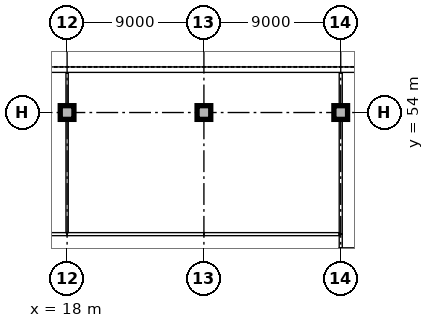
"""IFC4 building model, lengths in metres.
Left out: names, types, materials, properties, quantities, classifications, styles, units other than length and angle.
Written with IfcOpenShell. Run it as: python <this file> out.ifc"""

import sys

from ifc_helpers import new_model, si_unit, direction, frame, frame_2d, origin, origin_2d, place, context, subcontext, project, spatial, rectangle, extrude, element, fill, save


model = new_model("IFC4")
c1 = context("Model", 3, precision=1e-05, world=origin(), true_north=direction((0.0, 1.0)))
c2 = subcontext(c1, "Body", "Model", "MODEL_VIEW")
j1 = project(units=[si_unit("LENGTHUNIT", "METRE"), si_unit("PLANEANGLEUNIT", "RADIAN")], contexts=[c1])
p1 = place(None, origin())
s1 = spatial("IfcSite", under=j1, at=p1, CompositionType="ELEMENT")
p2 = place(p1, origin())
s2 = spatial("IfcBuilding", under=s1, at=p2, CompositionType="ELEMENT")
p3 = place(p2, origin())
s3 = spatial("IfcBuildingStorey", under=s2, at=p3, CompositionType="ELEMENT", Elevation=0.0)
for number, where, z_axis, x_axis in (
    (1, (18.0, 54.0, 0.0), (0.0, 0.0, 1.0), (1.0, 0.0, 0.0)),
    (2, (27.0, 54.0, 0.0), (0.0, 0.0, 1.0), (1.0, 0.0, 0.0)),
    (3, (36.0, 54.0, 0.0), (0.0, 0.0, 1.0), (1.0, 0.0, 0.0)),
):
    element("IfcColumn", number, at=place(p3, frame(where, z_axis=z_axis, x_axis=x_axis)), inside=s3, PredefinedType="COLUMN", context=c2, shape_type="SweptSolid", body=[
        extrude(rectangle(XDim=0.9, YDim=0.9, at=origin_2d()), origin(), (0.0, 0.0, 1.0), 5.7),
    ])
p4 = place(p3, frame((63.0, 56.82, 0.0), z_axis=(0.0, 0.0, 1.0), x_axis=(-1.0, 0.0, 0.0)))
e4 = element("IfcWall", 4, at=p4, inside=s3, PredefinedType="STANDARD", context=c2, shape_type="SweptSolid", body=[
    extrude(rectangle(XDim=57.4, YDim=0.36, at=frame_2d((28.7, 0.0))), origin(), (0.0, 0.0, 1.0), 5.7),
])
p5 = place(p4, frame((32.55, 0.0, 0.0)))
e5 = element("IfcOpeningElement", 5, at=p5, cuts=e4, PredefinedType="OPENING", context=c2, shape_type="SweptSolid", body=[
    extrude(rectangle(XDim=2.4, YDim=2.4, at=frame_2d((1.2, 1.2))), frame((0.0, 0.19, 0.0), z_axis=(0.0, -1.0, 0.0), x_axis=(1.0, 0.0, 0.0)), (0.0, 0.0, 1.0), 0.38),
])
p6 = place(p4, frame((48.3, 0.0, 0.0)))
e6 = element("IfcOpeningElement", 6, at=p6, cuts=e4, PredefinedType="OPENING", context=c2, shape_type="SweptSolid", body=[
    extrude(rectangle(XDim=2.4, YDim=2.2, at=frame_2d((1.2, 1.1))), frame((0.0, 0.19, 0.0), z_axis=(0.0, -1.0, 0.0), x_axis=(1.0, 0.0, 0.0)), (0.0, 0.0, 1.0), 0.38),
])
p7 = place(p4, frame((39.3, 0.0, 0.0)))
e7 = element("IfcOpeningElement", 7, at=p7, cuts=e4, PredefinedType="OPENING", context=c2, shape_type="SweptSolid", body=[
    extrude(rectangle(XDim=2.4, YDim=2.2, at=frame_2d((1.2, 1.1))), frame((0.0, 0.19, 0.0), z_axis=(0.0, -1.0, 0.0), x_axis=(1.0, 0.0, 0.0)), (0.0, 0.0, 1.0), 0.38),
])
p8 = place(p4, frame((12.3, 0.0, 0.0)))
e8 = element("IfcOpeningElement", 8, at=p8, cuts=e4, PredefinedType="OPENING", context=c2, shape_type="SweptSolid", body=[
    extrude(rectangle(XDim=2.4, YDim=2.2, at=frame_2d((1.2, 1.1))), frame((0.0, 0.19, 0.0), z_axis=(0.0, -1.0, 0.0), x_axis=(1.0, 0.0, 0.0)), (0.0, 0.0, 1.0), 0.38),
])
p9 = place(p4, frame((21.6, 0.0, 0.0)))
e9 = element("IfcOpeningElement", 9, at=p9, cuts=e4, PredefinedType="OPENING", context=c2, shape_type="SweptSolid", body=[
    extrude(rectangle(XDim=1.8, YDim=2.2, at=frame_2d((0.9, 1.1))), frame((0.0, 0.19, 0.0), z_axis=(0.0, -1.0, 0.0), x_axis=(1.0, 0.0, 0.0)), (0.0, 0.0, 1.0), 0.38),
])
p10 = place(p4, frame((2.1, 0.0, 0.0)))
e10 = element("IfcOpeningElement", 10, at=p10, cuts=e4, PredefinedType="OPENING", context=c2, shape_type="SweptSolid", body=[
    extrude(rectangle(XDim=1.8, YDim=2.2, at=frame_2d((0.9, 1.1))), frame((0.0, 0.19, 0.0), z_axis=(0.0, -1.0, 0.0), x_axis=(1.0, 0.0, 0.0)), (0.0, 0.0, 1.0), 0.38),
])
p11 = place(p4, frame((7.35, 0.0, 0.6)))
e11 = element("IfcOpeningElement", 11, at=p11, cuts=e4, PredefinedType="OPENING", context=c2, shape_type="SweptSolid", body=[
    extrude(rectangle(XDim=3.3, YDim=3.0, at=frame_2d((1.65, 1.5))), frame((0.0, 0.19, 0.0), z_axis=(0.0, -1.0, 0.0), x_axis=(1.0, 0.0, 0.0)), (0.0, 0.0, 1.0), 0.38),
])
p12 = place(p4, frame((16.35, 0.0, 0.6)))
e12 = element("IfcOpeningElement", 12, at=p12, cuts=e4, PredefinedType="OPENING", context=c2, shape_type="SweptSolid", body=[
    extrude(rectangle(XDim=3.3, YDim=3.0, at=frame_2d((1.65, 1.5))), frame((0.0, 0.19, 0.0), z_axis=(0.0, -1.0, 0.0), x_axis=(1.0, 0.0, 0.0)), (0.0, 0.0, 1.0), 0.38),
])
p13 = place(p4, frame((25.35, 0.0, 0.6)))
e13 = element("IfcOpeningElement", 13, at=p13, cuts=e4, PredefinedType="OPENING", context=c2, shape_type="SweptSolid", body=[
    extrude(rectangle(XDim=3.3, YDim=3.0, at=frame_2d((1.65, 1.5))), frame((0.0, 0.19, 0.0), z_axis=(0.0, -1.0, 0.0), x_axis=(1.0, 0.0, 0.0)), (0.0, 0.0, 1.0), 0.38),
])
p14 = place(p4, frame((43.35, 0.0, 0.6)))
e14 = element("IfcOpeningElement", 14, at=p14, cuts=e4, PredefinedType="OPENING", context=c2, shape_type="SweptSolid", body=[
    extrude(rectangle(XDim=3.3, YDim=3.0, at=frame_2d((1.65, 1.5))), frame((0.0, 0.19, 0.0), z_axis=(0.0, -1.0, 0.0), x_axis=(1.0, 0.0, 0.0)), (0.0, 0.0, 1.0), 0.38),
])
p15 = place(p4, frame((52.35, 0.0, 0.6)))
e15 = element("IfcOpeningElement", 15, at=p15, cuts=e4, PredefinedType="OPENING", context=c2, shape_type="SweptSolid", body=[
    extrude(rectangle(XDim=3.3, YDim=3.0, at=frame_2d((1.65, 1.5))), frame((0.0, 0.19, 0.0), z_axis=(0.0, -1.0, 0.0), x_axis=(1.0, 0.0, 0.0)), (0.0, 0.0, 1.0), 0.38),
])
p16 = place(p3, frame((36.0, 45.1, 0.0), z_axis=(0.0, 0.0, 1.0), x_axis=(0.0, 1.0, 0.0)))
e16 = element("IfcWall", 16, at=p16, inside=s3, PredefinedType="SOLIDWALL", context=c2, shape_type="SweptSolid", body=[
    extrude(rectangle(XDim=0.9, YDim=0.2, at=frame_2d((0.45, 0.0))), origin(), (0.0, 0.0, 1.0), 5.7),
])
p17 = place(p3, frame((35.9, 45.0, 0.0), z_axis=(0.0, 0.0, 1.0), x_axis=(1.0, 0.0, 0.0)))
e17 = element("IfcWall", 17, at=p17, inside=s3, PredefinedType="SOLIDWALL", context=c2, shape_type="SweptSolid", body=[
    extrude(rectangle(XDim=9.2, YDim=0.2, at=frame_2d((4.6, 0.0))), origin(), (0.0, 0.0, 1.0), 5.7),
])
p18 = place(p3, frame((36.0, 46.0, 0.0), z_axis=(0.0, 0.0, 1.0), x_axis=(0.0, 1.0, 0.0)))
e18 = element("IfcWall", 18, at=p18, inside=s3, PredefinedType="SOLIDWALL", context=c2, shape_type="SweptSolid", body=[
    extrude(rectangle(XDim=7.53, YDim=0.2, at=frame_2d((3.765, 0.0))), origin(), (0.0, 0.0, 1.0), 5.7),
])
p19 = place(p3, frame((36.0, 54.47, 0.0), z_axis=(0.0, 0.0, 1.0), x_axis=(0.0, 1.0, 0.0)))
e19 = element("IfcWall", 19, at=p19, inside=s3, PredefinedType="SOLIDWALL", context=c2, shape_type="SweptSolid", body=[
    extrude(rectangle(XDim=2.13, YDim=0.2, at=frame_2d((1.065, 0.0))), origin(), (0.0, 0.0, 1.0), 5.7),
])
p20 = place(p3, frame((9.0, 46.0, 0.0), z_axis=(0.0, 0.0, 1.0), x_axis=(1.0, 0.0, 0.0)))
e20 = element("IfcWall", 20, at=p20, inside=s3, PredefinedType="PARTITIONING", context=c2, shape_type="SweptSolid", body=[
    extrude(rectangle(XDim=9.0, YDim=0.2, at=frame_2d((4.5, 0.0))), origin(), (0.0, 0.0, 1.0), 5.7),
])
p21 = place(p20, frame((4.0, 0.0, 0.0)))
e21 = element("IfcOpeningElement", 21, at=p21, cuts=e20, PredefinedType="OPENING", context=c2, shape_type="SweptSolid", body=[
    extrude(rectangle(XDim=1.0, YDim=2.1, at=frame_2d((0.5, 1.05))), frame((0.0, 0.11, 0.0), z_axis=(0.0, -1.0, 0.0), x_axis=(1.0, 0.0, 0.0)), (0.0, 0.0, 1.0), 0.22),
])
p22 = place(p3, frame((18.0, 46.0, 0.0), z_axis=(0.0, 0.0, 1.0), x_axis=(1.0, 0.0, 0.0)))
e22 = element("IfcWall", 22, at=p22, inside=s3, PredefinedType="PARTITIONING", context=c2, shape_type="SweptSolid", body=[
    extrude(rectangle(XDim=9.0, YDim=0.2, at=frame_2d((4.5, 0.0))), origin(), (0.0, 0.0, 1.0), 5.7),
])
p23 = place(p22, frame((7.7, 0.0, 0.0)))
e23 = element("IfcOpeningElement", 23, at=p23, cuts=e22, PredefinedType="OPENING", context=c2, shape_type="SweptSolid", body=[
    extrude(rectangle(XDim=1.0, YDim=2.1, at=frame_2d((0.5, 1.05))), frame((0.0, 0.11, 0.0), z_axis=(0.0, -1.0, 0.0), x_axis=(1.0, 0.0, 0.0)), (0.0, 0.0, 1.0), 0.22),
])
p24 = place(p3, frame((27.0, 46.0, 0.0), z_axis=(0.0, 0.0, 1.0), x_axis=(1.0, 0.0, 0.0)))
e24 = element("IfcWall", 24, at=p24, inside=s3, PredefinedType="PARTITIONING", context=c2, shape_type="SweptSolid", body=[
    extrude(rectangle(XDim=8.9, YDim=0.2, at=frame_2d((4.45, 0.0))), origin(), (0.0, 0.0, 1.0), 5.7),
])
p25 = place(p3, frame((18.0, 46.1, 0.0), z_axis=(0.0, 0.0, 1.0), x_axis=(0.0, 1.0, 0.0)))
e25 = element("IfcWall", 25, at=p25, inside=s3, PredefinedType="PARTITIONING", context=c2, shape_type="SweptSolid", body=[
    extrude(rectangle(XDim=7.43, YDim=0.15, at=frame_2d((3.715, 0.0))), origin(), (0.0, 0.0, 1.0), 5.7),
])
p26 = place(p3, frame((18.0, 54.47, 0.0), z_axis=(0.0, 0.0, 1.0), x_axis=(0.0, 1.0, 0.0)))
e26 = element("IfcWall", 26, at=p26, inside=s3, PredefinedType="PARTITIONING", context=c2, shape_type="SweptSolid", body=[
    extrude(rectangle(XDim=2.13, YDim=0.15, at=frame_2d((1.065, 0.0))), origin(), (0.0, 0.0, 1.0), 5.7),
])
p27 = place(p5, frame((2.4, 0.0, 0.0), z_axis=(0.0, 0.0, 1.0), x_axis=(-1.0, 0.0, 0.0)))
e27 = element("IfcDoor", 27, at=p27, inside=s3, OperationType="DOUBLE_DOOR_SINGLE_SWING", PredefinedType="DOOR", context=c2, shape_type="SweptSolid", body=[
    extrude(rectangle(XDim=2.4, YDim=2.4, at=frame_2d((1.2, 1.2))), frame((0.0, -0.07, 0.0), z_axis=(0.0, -1.0, 0.0), x_axis=(1.0, 0.0, 0.0)), (0.0, 0.0, 1.0), 0.05),
])
fill(e5, e27)
p28 = place(p7, frame((2.4, 0.0, 0.0), z_axis=(0.0, 0.0, 1.0), x_axis=(-1.0, 0.0, 0.0)))
e28 = element("IfcDoor", 28, at=p28, inside=s3, OperationType="DOUBLE_DOOR_SINGLE_SWING", PredefinedType="DOOR", context=c2, shape_type="SweptSolid", body=[
    extrude(rectangle(XDim=2.4, YDim=2.2, at=frame_2d((1.2, 1.1))), frame((0.0, -0.07, 0.0), z_axis=(0.0, -1.0, 0.0), x_axis=(1.0, 0.0, 0.0)), (0.0, 0.0, 1.0), 0.05),
])
fill(e7, e28)
p29 = place(p13, origin())
e29 = element("IfcWindow", 29, at=p29, inside=s3, PartitioningType="SINGLE_PANEL", PredefinedType="WINDOW", context=c2, shape_type="SweptSolid", body=[
    extrude(rectangle(XDim=3.3, YDim=3.0, at=frame_2d((1.65, 1.5))), frame((0.0, 0.13, 0.0), z_axis=(0.0, -1.0, 0.0), x_axis=(1.0, 0.0, 0.0)), (0.0, 0.0, 1.0), 0.06),
])
fill(e13, e29)
p30 = place(p14, origin())
e30 = element("IfcWindow", 30, at=p30, inside=s3, PartitioningType="SINGLE_PANEL", PredefinedType="WINDOW", context=c2, shape_type="SweptSolid", body=[
    extrude(rectangle(XDim=3.3, YDim=3.0, at=frame_2d((1.65, 1.5))), frame((0.0, 0.13, 0.0), z_axis=(0.0, -1.0, 0.0), x_axis=(1.0, 0.0, 0.0)), (0.0, 0.0, 1.0), 0.06),
])
fill(e14, e30)
p31 = place(p23, origin())
e31 = element("IfcDoor", 31, at=p31, inside=s3, OperationType="SINGLE_SWING_RIGHT", PredefinedType="DOOR", context=c2, shape_type="SweptSolid", body=[
    extrude(rectangle(XDim=1.0, YDim=2.1, at=frame_2d((0.5, 1.05))), frame((0.0, 0.025, 0.0), z_axis=(0.0, -1.0, 0.0), x_axis=(1.0, 0.0, 0.0)), (0.0, 0.0, 1.0), 0.05),
])
fill(e23, e31)
save(model, sys.argv[1])
